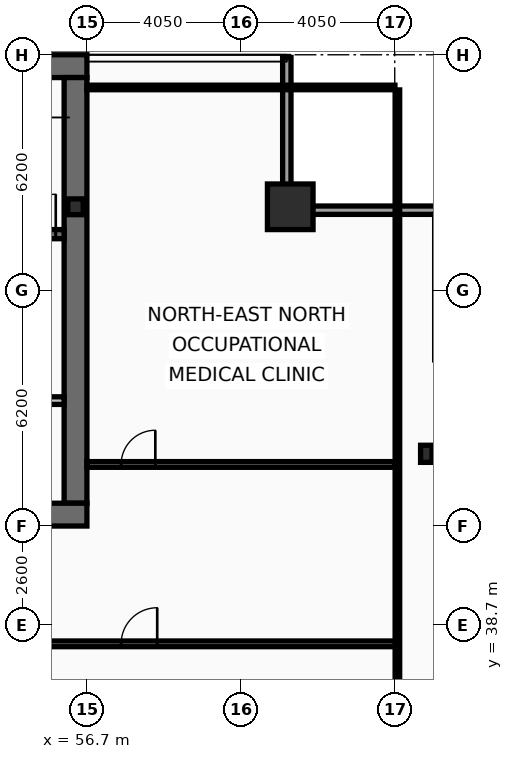
"""IFC4 building model, lengths in metres.
Left out: names, types, materials, properties, quantities, classifications, styles, units other than length and angle.
Written with IfcOpenShell. Run it as: python <this file> out.ifc"""

import sys

from ifc_helpers import new_model, si_unit, direction, frame, frame_2d, origin, origin_2d, place, context, subcontext, project, spatial, rectangle, hollow_rectangle, i_section, extrude, element, fill, save


model = new_model("IFC4")
c1 = context("Model", 3, precision=1e-05, world=origin(), true_north=direction((0.0, 1.0)))
c2 = subcontext(c1, "Body", "Model", "MODEL_VIEW")
j1 = project(units=[si_unit("LENGTHUNIT", "METRE"), si_unit("PLANEANGLEUNIT", "RADIAN")], contexts=[c1])
p1 = place(None, origin())
s1 = spatial("IfcSite", under=j1, at=p1, CompositionType="ELEMENT")
p2 = place(p1, origin())
s2 = spatial("IfcBuilding", under=s1, at=p2, CompositionType="ELEMENT")
p3 = place(p2, frame((0.0, 0.0, 203.0)))
s3 = spatial("IfcBuildingStorey", under=s2, at=p3, CompositionType="ELEMENT", Elevation=203.0)
p4 = place(p3, frame((16.2, 53.4, 0.0), z_axis=(0.0, 0.0, 1.0), x_axis=(1.0, 0.0, 0.0)))
e1 = element("IfcWall", 1, at=p4, inside=s3, PredefinedType="SHEAR", context=c2, shape_type="SweptSolid", body=[
    extrude(rectangle(XDim=40.5, YDim=0.6, at=frame_2d((20.25, 0.0))), origin(), (0.0, 0.0, 1.0), 3.44),
])
p5 = place(p3, frame((56.4, 53.1, 0.0), z_axis=(0.0, 0.0, 1.0), x_axis=(0.0, -1.0, 0.0)))
e2 = element("IfcWall", 2, at=p5, inside=s3, PredefinedType="SHEAR", context=c2, shape_type="SweptSolid", body=[
    extrude(rectangle(XDim=11.2, YDim=0.6, at=frame_2d((5.6, 0.0))), origin(), (0.0, 0.0, 1.0), 3.44),
])
p6 = place(p3, frame((56.7, 41.6, 0.0), z_axis=(0.0, 0.0, 1.0), x_axis=(-1.0, 0.0, 0.0)))
e3 = element("IfcWall", 3, at=p6, inside=s3, PredefinedType="SHEAR", context=c2, shape_type="SweptSolid", body=[
    extrude(rectangle(XDim=2.45, YDim=0.6, at=frame_2d((1.225, 0.0))), origin(), (0.0, 0.0, 1.0), 3.44),
])
p7 = place(p3, frame((48.63, 48.98, 0.0), z_axis=(0.0, 0.0, 1.0), x_axis=(1.0, 0.0, 0.0)))
e4 = element("IfcWall", 4, at=p7, inside=s3, PredefinedType="SHEAR", context=c2, shape_type="SweptSolid", body=[
    extrude(rectangle(XDim=7.47, YDim=0.24, at=frame_2d((3.735, 0.0))), origin(), (0.0, 0.0, 1.0), 3.44),
])
p8 = place(p7, frame((6.2, 0.0, 0.0)))
e5 = element("IfcOpeningElement", 5, at=p8, cuts=e4, PredefinedType="OPENING", context=c2, shape_type="SweptSolid", body=[
    extrude(rectangle(XDim=1.05, YDim=2.15, at=frame_2d((0.525, 1.075))), frame((0.0, 0.13, 0.0), z_axis=(0.0, -1.0, 0.0), x_axis=(1.0, 0.0, 0.0)), (0.0, 0.0, 1.0), 0.26),
])
p9 = place(p3, frame((62.05, 49.7, 0.0), z_axis=(0.0, 0.0, 1.0), x_axis=(1.0, 0.0, 0.0)))
e6 = element("IfcColumn", 6, at=p9, inside=s3, PredefinedType="COLUMN", context=c2, shape_type="SweptSolid", body=[
    extrude(hollow_rectangle(XDim=1.2, YDim=1.2, WallThickness=0.06, at=origin_2d()), origin(), (0.0, 0.0, 1.0), 3.6),
])
p10 = place(p3, frame((65.63, 43.2, 0.0), z_axis=(0.0, 0.0, 1.0), x_axis=(1.0, 0.0, 0.0)))
e7 = element("IfcColumn", 7, at=p10, inside=s3, PredefinedType="COLUMN", context=c2, shape_type="SweptSolid", body=[
    extrude(i_section(OverallWidth=0.3, OverallDepth=0.45, WebThickness=0.014, FlangeThickness=0.026, at=origin_2d()), origin(), (0.0, 0.0, 1.0), 3.6),
])
p11 = place(p3, frame((56.4, 49.7, 0.0), z_axis=(0.0, 0.0, 1.0), x_axis=(1.0, 0.0, 0.0)))
e8 = element("IfcColumn", 8, at=p11, inside=s3, PredefinedType="COLUMN", context=c2, shape_type="SweptSolid", body=[
    extrude(i_section(OverallWidth=0.406, OverallDepth=0.416, WebThickness=0.03, FlangeThickness=0.048, at=origin_2d()), origin(), (0.0, 0.0, 1.0), 3.6),
])
p12 = place(p3, frame((61.96, 53.63, 0.0), z_axis=(0.0, 0.0, 1.0), x_axis=(0.0, -1.0, 0.0)))
e9 = element("IfcWall", 9, at=p12, inside=s3, PredefinedType="SOLIDWALL", context=c2, shape_type="SweptSolid", body=[
    extrude(rectangle(XDim=3.91, YDim=0.22, at=frame_2d((1.955, 0.0))), origin(), (0.0, 0.0, 1.0), 2.83),
])
p13 = place(p3, frame((61.85, 49.61, 0.0), z_axis=(0.0, 0.0, 1.0), x_axis=(1.0, 0.0, 0.0)))
e10 = element("IfcWall", 10, at=p13, inside=s3, PredefinedType="SOLIDWALL", context=c2, shape_type="SweptSolid", body=[
    extrude(rectangle(XDim=4.22, YDim=0.22, at=frame_2d((2.11, 0.0))), origin(), (0.0, 0.0, 1.0), 2.83),
])
p14 = place(p3, frame((51.9, 44.6, 0.0), z_axis=(0.0, 0.0, 1.0), x_axis=(1.0, 0.0, 0.0)))
e11 = element("IfcWall", 11, at=p14, inside=s3, PredefinedType="PARTITIONING", context=c2, shape_type="SweptSolid", body=[
    extrude(rectangle(XDim=4.2, YDim=0.2, at=frame_2d((2.1, 0.0))), origin(), (0.0, 0.0, 1.0), 3.44),
])
p15 = place(p14, frame((1.15, 0.0, 0.0)))
e12 = element("IfcOpeningElement", 12, at=p15, cuts=e11, PredefinedType="OPENING", context=c2, shape_type="SweptSolid", body=[
    extrude(rectangle(XDim=1.05, YDim=2.15, at=frame_2d((0.525, 1.075))), frame((0.0, 0.11, 0.0), z_axis=(0.0, -1.0, 0.0), x_axis=(1.0, 0.0, 0.0)), (0.0, 0.0, 1.0), 0.22),
])
p16 = place(p3, frame((54.35, 38.2, 0.0), z_axis=(0.0, 0.0, 1.0), x_axis=(1.0, 0.0, 0.0)))
e13 = element("IfcWall", 13, at=p16, inside=s3, PredefinedType="PARTITIONING", context=c2, shape_type="SweptSolid", body=[
    extrude(rectangle(XDim=10.52, YDim=0.15, at=frame_2d((5.26, 0.0))), origin(), (0.0, 0.0, 1.0), 2.73),
])
p17 = place(p16, frame((3.25, 0.0, 0.0)))
e14 = element("IfcOpeningElement", 14, at=p17, cuts=e13, PredefinedType="OPENING", context=c2, shape_type="SweptSolid", body=[
    extrude(rectangle(XDim=0.95, YDim=2.05, at=frame_2d((0.475, 1.025))), frame((0.0, 0.085, 0.0), z_axis=(0.0, -1.0, 0.0), x_axis=(1.0, 0.0, 0.0)), (0.0, 0.0, 1.0), 0.17),
])
p18 = place(p3, frame((56.7, 42.92, 0.0), z_axis=(0.0, 0.0, 1.0), x_axis=(1.0, 0.0, 0.0)))
e15 = element("IfcWall", 15, at=p18, inside=s3, PredefinedType="PARTITIONING", context=c2, shape_type="SweptSolid", body=[
    extrude(rectangle(XDim=8.105, YDim=0.15, at=frame_2d((4.052, 0.0))), origin(), (0.0, 0.0, 1.0), 2.73),
])
p19 = place(p18, frame((0.9, 0.0, 0.0)))
e16 = element("IfcOpeningElement", 16, at=p19, cuts=e15, PredefinedType="OPENING", context=c2, shape_type="SweptSolid", body=[
    extrude(rectangle(XDim=0.9, YDim=2.05, at=frame_2d((0.45, 1.025))), frame((0.0, 0.085, 0.0), z_axis=(0.0, -1.0, 0.0), x_axis=(1.0, 0.0, 0.0)), (0.0, 0.0, 1.0), 0.17),
])
p20 = place(p3, frame((64.87, 10.665, 0.0), z_axis=(0.0, 0.0, 1.0), x_axis=(0.0, 1.0, 0.0)))
e17 = element("IfcWall", 17, at=p20, inside=s3, PredefinedType="PARTITIONING", context=c2, shape_type="SweptSolid", body=[
    extrude(rectangle(XDim=42.11, YDim=0.12, at=frame_2d((21.055, 0.0))), origin(), (0.0, 0.0, 1.0), 2.73),
])
p21 = place(p3, frame((56.7, 52.84, 0.0), z_axis=(0.0, 0.0, 1.0), x_axis=(1.0, 0.0, 0.0)))
e18 = element("IfcWall", 18, at=p21, inside=s3, PredefinedType="PARTITIONING", context=c2, shape_type="SweptSolid", body=[
    extrude(rectangle(XDim=8.105, YDim=0.12, at=frame_2d((4.052, 0.0))), origin(), (0.0, 0.0, 1.0), 3.44),
])
p22 = place(p8, origin())
e19 = element("IfcDoor", 19, at=p22, inside=s3, OperationType="SINGLE_SWING_RIGHT", PredefinedType="DOOR", context=c2, shape_type="SweptSolid", body=[
    extrude(rectangle(XDim=1.05, YDim=2.15, at=frame_2d((0.525, 1.075))), frame((0.0, 0.025, 0.0), z_axis=(0.0, -1.0, 0.0), x_axis=(1.0, 0.0, 0.0)), (0.0, 0.0, 1.0), 0.05),
])
fill(e5, e19)
p23 = place(p17, origin())
e20 = element("IfcDoor", 20, at=p23, inside=s3, OperationType="SINGLE_SWING_RIGHT", PredefinedType="DOOR", context=c2, shape_type="SweptSolid", body=[
    extrude(rectangle(XDim=0.95, YDim=2.05, at=frame_2d((0.475, 1.025))), frame((0.0, 0.025, 0.0), z_axis=(0.0, -1.0, 0.0), x_axis=(1.0, 0.0, 0.0)), (0.0, 0.0, 1.0), 0.05),
])
fill(e14, e20)
p24 = place(p19, origin())
e21 = element("IfcDoor", 21, at=p24, inside=s3, OperationType="SINGLE_SWING_RIGHT", PredefinedType="DOOR", context=c2, shape_type="SweptSolid", body=[
    extrude(rectangle(XDim=0.9, YDim=2.05, at=frame_2d((0.45, 1.025))), frame((0.0, 0.025, 0.0), z_axis=(0.0, -1.0, 0.0), x_axis=(1.0, 0.0, 0.0)), (0.0, 0.0, 1.0), 0.05),
])
fill(e16, e21)
save(model, sys.argv[1])
